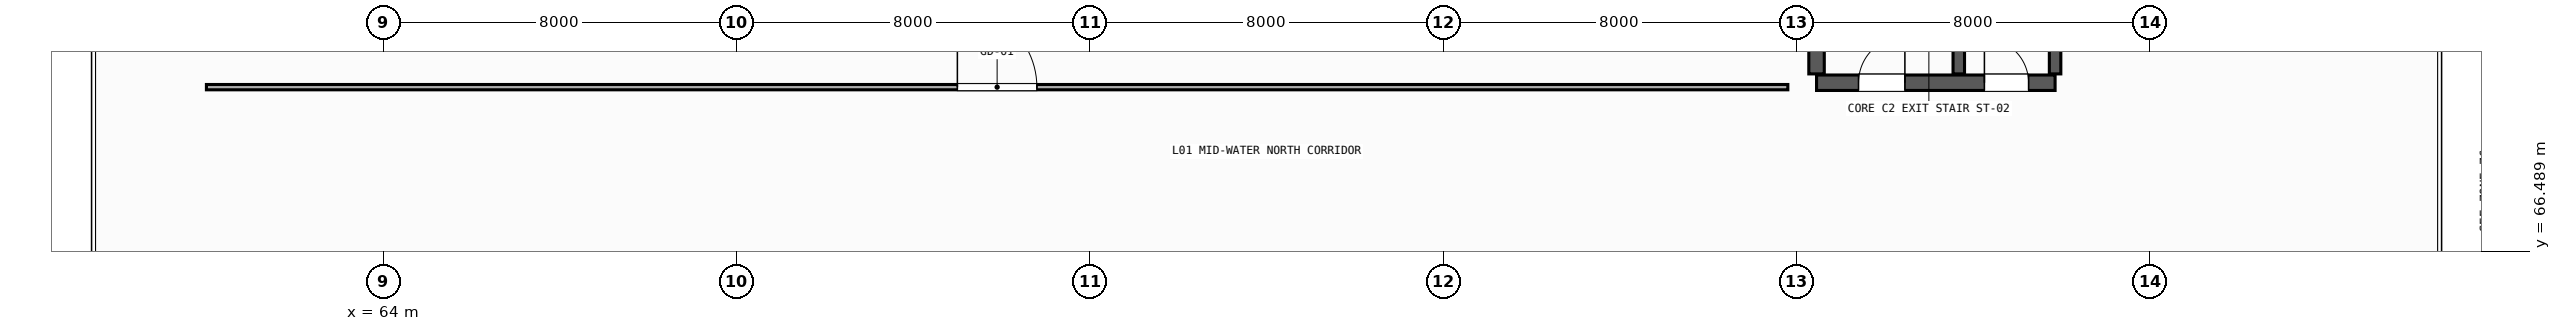
"""IFC4 building model, lengths in metres.
Left out: names, types, materials, properties, quantities, classifications, styles, units other than length and angle.
Written with IfcOpenShell. Run it as: python <this file> out.ifc"""

import sys

from ifc_helpers import new_model, si_unit, direction, frame, frame_2d, origin, place, context, subcontext, project, spatial, rectangle, extrude, element, fill, save


model = new_model("IFC4")
c1 = context("Model", 3, precision=1e-05, world=origin(), true_north=direction((0.0, 1.0)))
c2 = subcontext(c1, "Body", "Model", "MODEL_VIEW")
j1 = project(units=[si_unit("LENGTHUNIT", "METRE"), si_unit("PLANEANGLEUNIT", "RADIAN")], contexts=[c1])
p1 = place(None, origin())
s1 = spatial("IfcSite", under=j1, at=p1, CompositionType="ELEMENT")
p2 = place(p1, origin())
s2 = spatial("IfcBuilding", under=s1, at=p2, CompositionType="ELEMENT")
p3 = place(p2, frame((0.0, 0.0, 5.4)))
s3 = spatial("IfcBuildingStorey", under=s2, at=p3, CompositionType="ELEMENT", Elevation=5.4)
p4 = place(p3, frame((96.45, 70.3, 0.0), z_axis=(0.0, 0.0, 1.0), x_axis=(1.0, 0.0, 0.0)))
e1 = element("IfcWall", 1, at=p4, inside=s3, PredefinedType="SHEAR", context=c2, shape_type="SweptSolid", body=[
    extrude(rectangle(XDim=5.4, YDim=0.35, at=frame_2d((2.7, 0.0))), origin(), (0.0, 0.0, 1.0), 4.51),
])
p5 = place(p4, frame((0.95, 0.0, 0.0)))
e2 = element("IfcOpeningElement", 2, at=p5, cuts=e1, PredefinedType="OPENING", context=c2, shape_type="SweptSolid", body=[
    extrude(rectangle(XDim=1.05, YDim=2.1, at=frame_2d((0.525, 1.05))), frame((0.0, 0.185, 0.0), z_axis=(0.0, -1.0, 0.0), x_axis=(1.0, 0.0, 0.0)), (0.0, 0.0, 1.0), 0.37),
])
p6 = place(p4, frame((3.8, 0.0, 0.0)))
e3 = element("IfcOpeningElement", 3, at=p6, cuts=e1, PredefinedType="OPENING", context=c2, shape_type="SweptSolid", body=[
    extrude(rectangle(XDim=1.0, YDim=2.15, at=frame_2d((0.5, 1.075))), frame((0.0, 0.185, 0.0), z_axis=(0.0, -1.0, 0.0), x_axis=(1.0, 0.0, 0.0)), (0.0, 0.0, 1.0), 0.37),
])
p7 = place(p3, frame((96.45, 70.5, 0.0), z_axis=(0.0, 0.0, 1.0), x_axis=(0.0, 1.0, 0.0)))
e4 = element("IfcWall", 4, at=p7, inside=s3, PredefinedType="SHEAR", context=c2, shape_type="SweptSolid", body=[
    extrude(rectangle(XDim=6.95, YDim=0.35, at=frame_2d((3.475, 0.0))), origin(), (0.0, 0.0, 1.0), 4.51),
])
for number, where, z_axis, x_axis in (
    (5, (101.85, 70.5, 0.0), (0.0, 0.0, 1.0), (0.0, 1.0, 0.0)),
    (6, (99.67, 70.5, 0.0), (0.0, 0.0, 1.0), (0.0, 1.0, 0.0)),
):
    element("IfcWall", number, at=place(p3, frame(where, z_axis=z_axis, x_axis=x_axis)), inside=s3, PredefinedType="SHEAR", context=c2, shape_type="SweptSolid", body=[
        extrude(rectangle(XDim=6.95, YDim=0.26, at=frame_2d((3.475, 0.0))), origin(), (0.0, 0.0, 1.0), 4.51),
    ])
p8 = place(p3, frame((60.0, 70.2, 0.0), z_axis=(0.0, 0.0, 1.0), x_axis=(1.0, 0.0, 0.0)))
e7 = element("IfcWall", 7, at=p8, inside=s3, PredefinedType="PARTITIONING", context=c2, shape_type="SweptSolid", body=[
    extrude(rectangle(XDim=35.8, YDim=0.12, at=frame_2d((17.9, 0.0))), origin(), (0.0, 0.0, 1.0), 3.797),
])
p9 = place(p8, frame((17.0, 0.0, 0.0)))
e8 = element("IfcOpeningElement", 8, at=p9, cuts=e7, PredefinedType="OPENING", context=c2, shape_type="SweptSolid", body=[
    extrude(rectangle(XDim=1.8, YDim=2.4, at=frame_2d((0.9, 1.2))), frame((0.0, 0.07, 0.0), z_axis=(0.0, -1.0, 0.0), x_axis=(1.0, 0.0, 0.0)), (0.0, 0.0, 1.0), 0.14),
])
p10 = place(p5, origin())
e9 = element("IfcDoor", 9, at=p10, inside=s3, OperationType="SINGLE_SWING_RIGHT", PredefinedType="DOOR", context=c2, shape_type="SweptSolid", body=[
    extrude(rectangle(XDim=1.05, YDim=2.1, at=frame_2d((0.525, 1.05))), frame((0.0, 0.025, 0.0), z_axis=(0.0, -1.0, 0.0), x_axis=(1.0, 0.0, 0.0)), (0.0, 0.0, 1.0), 0.05),
])
fill(e2, e9)
p11 = place(p6, origin())
e10 = element("IfcDoor", 10, at=p11, inside=s3, OperationType="SINGLE_SWING_LEFT", PredefinedType="DOOR", context=c2, shape_type="SweptSolid", body=[
    extrude(rectangle(XDim=1.0, YDim=2.15, at=frame_2d((0.5, 1.075))), frame((0.0, 0.025, 0.0), z_axis=(0.0, -1.0, 0.0), x_axis=(1.0, 0.0, 0.0)), (0.0, 0.0, 1.0), 0.05),
])
fill(e3, e10)
p12 = place(p9, origin())
e11 = element("IfcDoor", 11, at=p12, inside=s3, OperationType="SINGLE_SWING_LEFT", PredefinedType="DOOR", context=c2, shape_type="SweptSolid", body=[
    extrude(rectangle(XDim=1.8, YDim=2.4, at=frame_2d((0.9, 1.2))), frame((0.0, 0.025, 0.0), z_axis=(0.0, -1.0, 0.0), x_axis=(1.0, 0.0, 0.0)), (0.0, 0.0, 1.0), 0.05),
])
fill(e8, e11)
save(model, sys.argv[1])
